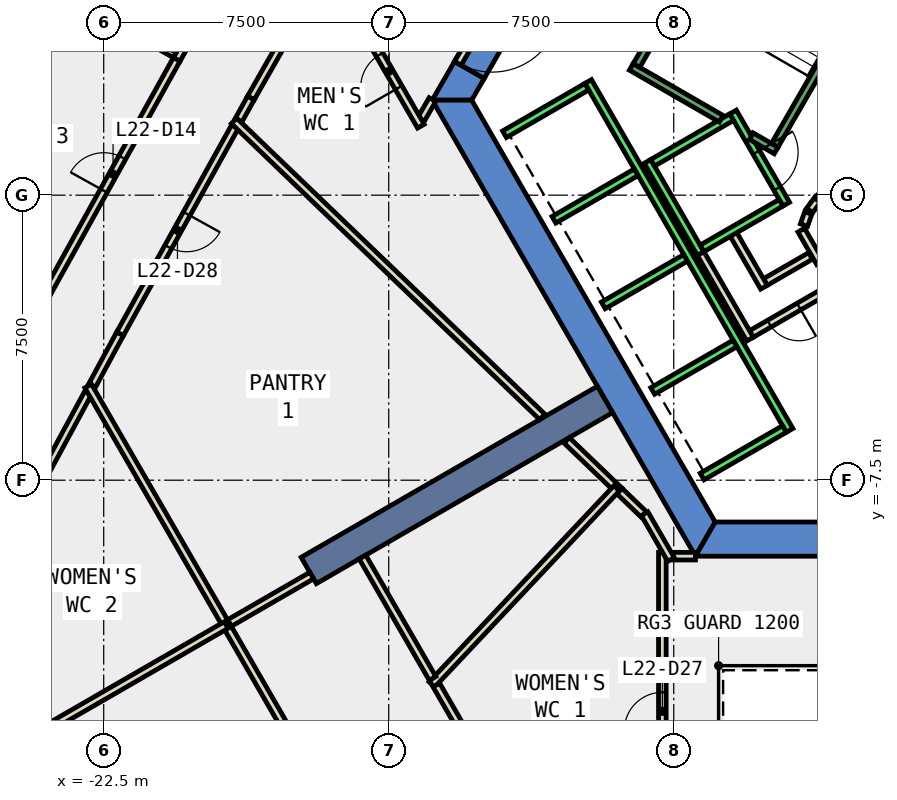
"""IFC4 building model, lengths in metres.
Left out: names, types, materials, properties, quantities, classifications, styles, units other than length and angle.
Written with IfcOpenShell. Run it as: python <this file> out.ifc"""

import sys

from ifc_helpers import new_model, si_unit, direction, frame, frame_2d, origin, place, context, subcontext, project, spatial, polyline, rectangle, outline, extrude, element, fill, save


model = new_model("IFC4")
c1 = context("Model", 3, precision=1e-05, world=origin(), true_north=direction((0.0, 1.0)))
c2 = subcontext(c1, "Body", "Model", "MODEL_VIEW")
j1 = project(units=[si_unit("LENGTHUNIT", "METRE"), si_unit("PLANEANGLEUNIT", "RADIAN")], contexts=[c1])
p1 = place(None, origin())
s1 = spatial("IfcSite", under=j1, at=p1, CompositionType="ELEMENT")
p2 = place(p1, origin())
s2 = spatial("IfcBuilding", under=s1, at=p2, CompositionType="ELEMENT")
p3 = place(p2, frame((0.0, 0.0, 103.4)))
s3 = spatial("IfcBuildingStorey", under=s2, at=p3, CompositionType="ELEMENT", Elevation=103.4)
p4 = place(p3, frame((0.0, 0.0, -0.4)))
e1 = element("IfcWall", 1, at=p4, inside=s3, PredefinedType="SHEAR", context=c2, shape_type="SweptSolid", body=[
    extrude(outline(polyline([(-12.488, 3.07), (-13.267, 3.52), (-13.856, 2.5), (-12.817, 2.5), (-12.488, 3.07)])), origin(), (0.0, 0.0, 1.0), 4.2),
])
p5 = place(p3, frame((0.0, 0.0, 3.6)))
e2 = element("IfcWall", 2, at=p5, inside=s3, PredefinedType="SHEAR", context=c2, shape_type="SweptSolid", body=[
    extrude(outline(polyline([(-13.267, 3.52), (-12.488, 3.07), (-11.488, 4.802), (-12.267, 5.252), (-13.267, 3.52)])), origin(), (0.0, 0.0, 1.0), 0.2),
])
p6 = place(p3, frame((0.0, 0.0, -0.4)))
e3 = element("IfcWall", 3, at=p6, inside=s3, PredefinedType="SHEAR", context=c2, shape_type="SweptSolid", body=[
    extrude(outline(polyline([(-13.856, 2.5), (-6.928, -9.5), (-6.409, -8.6), (-12.817, 2.5), (-13.856, 2.5)])), origin(), (0.0, 0.0, 1.0), 4.2),
])
p7 = place(p3, frame((0.0, 0.0, -0.4)))
e4 = element("IfcWall", 4, at=p7, inside=s3, PredefinedType="SHEAR", context=c2, shape_type="SweptSolid", body=[
    extrude(outline(polyline([(3.75, -9.5), (3.75, -8.6), (-6.409, -8.6), (-6.928, -9.5), (3.75, -9.5)])), origin(), (0.0, 0.0, 1.0), 4.2),
])
p8 = place(p3, frame((-9.31, -5.375, -0.4), z_axis=(0.0, 0.0, 1.0), x_axis=(-0.866017533419, -0.500013631625, 0.0)))
e5 = element("IfcWall", 5, at=p8, inside=s3, PredefinedType="SHEAR", context=c2, shape_type="SweptSolid", body=[
    extrude(rectangle(XDim=9.0, YDim=0.8, at=frame_2d((4.5, 0.0))), origin(), (0.0, 0.0, 1.0), 4.2),
])
p9 = place(p3, frame((-13.85, 2.514, 0.0), z_axis=(0.0, 0.0, 1.0), x_axis=(-0.500418219013, -0.865783810244, 0.0)))
e6 = element("IfcWall", 6, at=p9, inside=s3, PredefinedType="PARTITIONING", context=c2, shape_type="SweptSolid", body=[
    extrude(rectangle(XDim=0.607, YDim=0.2, at=frame_2d((0.304, 0.0))), origin(), (0.0, 0.0, 1.0), 3.8),
])
p10 = place(p3, frame((-14.154, 1.815, 0.0), z_axis=(0.0, 0.0, 1.0), x_axis=(-0.500038857296, 0.866002968352, 0.0)))
e7 = element("IfcWall", 7, at=p10, inside=s3, PredefinedType="PARTITIONING", context=c2, shape_type="SweptSolid", body=[
    extrude(rectangle(XDim=3.34, YDim=0.2, at=frame_2d((1.67, 0.0))), origin(), (0.0, 0.0, 1.0), 3.8),
])
p11 = place(p10, frame((1.17, 0.0, 0.0)))
e8 = element("IfcOpeningElement", 8, at=p11, cuts=e7, PredefinedType="OPENING", context=c2, shape_type="SweptSolid", body=[
    extrude(rectangle(XDim=1.0, YDim=2.1, at=frame_2d((0.5, 1.05))), frame((0.0, 0.11, 0.0), z_axis=(0.0, -1.0, 0.0), x_axis=(1.0, 0.0, 0.0)), (0.0, 0.0, 1.0), 0.22),
])
p12 = place(p3, frame((-16.986, 5.436, 0.0), z_axis=(0.0, 0.0, 1.0), x_axis=(-0.49514688151, -0.868809280412, 0.0)))
e9 = element("IfcWall", 9, at=p12, inside=s3, PredefinedType="PARTITIONING", context=c2, shape_type="SweptSolid", body=[
    extrude(rectangle(XDim=3.314, YDim=0.2, at=frame_2d((1.657, 0.0))), origin(), (0.0, 0.0, 1.0), 3.8),
])
p13 = place(p3, frame((-18.627, 2.557, 0.0), z_axis=(0.0, 0.0, 1.0), x_axis=(-0.484771582084, -0.874640790956, 0.0)))
e10 = element("IfcWall", 10, at=p13, inside=s3, PredefinedType="PARTITIONING", context=c2, shape_type="SweptSolid", body=[
    extrude(rectangle(XDim=0.666, YDim=0.2, at=frame_2d((0.333, 0.0))), origin(), (0.0, 0.0, 1.0), 3.8),
])
p14 = place(p3, frame((-19.047, 1.799, 0.0), z_axis=(0.0, 0.0, 1.0), x_axis=(-0.485240396382, -0.87438078531, 0.0)))
e11 = element("IfcWall", 11, at=p14, inside=s3, PredefinedType="PARTITIONING", context=c2, shape_type="SweptSolid", body=[
    extrude(rectangle(XDim=6.232, YDim=0.2, at=frame_2d((3.116, 0.0))), origin(), (0.0, 0.0, 1.0), 3.8),
])
p15 = place(p14, frame((2.616, 0.0, 0.0)))
e12 = element("IfcOpeningElement", 12, at=p15, cuts=e11, PredefinedType="OPENING", context=c2, shape_type="SweptSolid", body=[
    extrude(rectangle(XDim=1.0, YDim=2.1, at=frame_2d((0.5, 1.05))), frame((0.0, 0.11, 0.0), z_axis=(0.0, -1.0, 0.0), x_axis=(1.0, 0.0, 0.0)), (0.0, 0.0, 1.0), 0.22),
])
p16 = place(p3, frame((-22.071, -3.65, 0.0), z_axis=(0.0, 0.0, 1.0), x_axis=(-0.475212034938, -0.879871309823, 0.0)))
e13 = element("IfcWall", 13, at=p16, inside=s3, PredefinedType="PARTITIONING", context=c2, shape_type="SweptSolid", body=[
    extrude(rectangle(XDim=1.557, YDim=0.2, at=frame_2d((0.779, 0.0))), origin(), (0.0, 0.0, 1.0), 3.8),
])
p17 = place(p3, frame((-22.906, -5.196, 0.0), z_axis=(0.0, 0.0, 1.0), x_axis=(-0.475448213767, -0.879743710421, 0.0)))
e14 = element("IfcWall", 14, at=p17, inside=s3, PredefinedType="PARTITIONING", context=c2, shape_type="SweptSolid", body=[
    extrude(rectangle(XDim=5.343, YDim=0.2, at=frame_2d((2.671, 0.0))), origin(), (0.0, 0.0, 1.0), 3.8),
])
p18 = place(p3, frame((-20.581, 3.571, 0.0), z_axis=(0.0, 0.0, 1.0), x_axis=(0.495138372197, 0.868814129937, 0.0)))
e15 = element("IfcWall", 15, at=p18, inside=s3, PredefinedType="PARTITIONING", context=c2, shape_type="SweptSolid", body=[
    extrude(rectangle(XDim=7.124, YDim=0.2, at=frame_2d((3.562, 0.0))), origin(), (0.0, 0.0, 1.0), 3.8),
])
p19 = place(p18, frame((3.137, 0.0, 0.0)))
e16 = element("IfcOpeningElement", 16, at=p19, cuts=e15, PredefinedType="OPENING", context=c2, shape_type="SweptSolid", body=[
    extrude(rectangle(XDim=1.0, YDim=2.1, at=frame_2d((0.5, 1.05))), frame((0.0, 0.11, 0.0), z_axis=(0.0, -1.0, 0.0), x_axis=(1.0, 0.0, 0.0)), (0.0, 0.0, 1.0), 0.22),
])
p20 = place(p3, frame((-24.0, -2.593, 0.0), z_axis=(0.0, 0.0, 1.0), x_axis=(0.485148833338, 0.874431592242, 0.0)))
e17 = element("IfcWall", 17, at=p20, inside=s3, PredefinedType="PARTITIONING", context=c2, shape_type="SweptSolid", body=[
    extrude(rectangle(XDim=7.049, YDim=0.2, at=frame_2d((3.525, 0.0))), origin(), (0.0, 0.0, 1.0), 3.8),
])
p21 = place(p20, frame((3.099, 0.0, 0.0)))
e18 = element("IfcOpeningElement", 18, at=p21, cuts=e17, PredefinedType="OPENING", context=c2, shape_type="SweptSolid", body=[
    extrude(rectangle(XDim=1.0, YDim=2.1, at=frame_2d((0.5, 1.05))), frame((0.0, 0.11, 0.0), z_axis=(0.0, -1.0, 0.0), x_axis=(1.0, 0.0, 0.0)), (0.0, 0.0, 1.0), 0.22),
])
p22 = place(p3, frame((-3.9, -1.599, 0.0), z_axis=(0.0, 0.0, 1.0), x_axis=(-0.865969445389, -0.500096910261, 0.0)))
e19 = element("IfcWall", 19, at=p22, inside=s3, PredefinedType="PARTITIONING", context=c2, shape_type="SweptSolid", body=[
    extrude(rectangle(XDim=1.373, YDim=0.2, at=frame_2d((0.687, 0.0))), origin(), (0.0, 0.0, 1.0), 3.8),
])
p23 = place(p3, frame((-5.126, -2.422, 0.0), z_axis=(0.0, 0.0, 1.0), x_axis=(-0.500062241894, 0.865989465428, 0.0)))
e20 = element("IfcWall", 20, at=p23, inside=s3, PredefinedType="PARTITIONING", context=c2, shape_type="SweptSolid", body=[
    extrude(rectangle(XDim=1.7, YDim=0.2, at=frame_2d((0.85, 0.0))), origin(), (0.0, 0.0, 1.0), 3.8),
])
p24 = place(p3, frame((-3.65, -2.61, 0.0), z_axis=(0.0, 0.0, 1.0), x_axis=(-0.866072462134, -0.499918483688, 0.0)))
e21 = element("IfcWall", 21, at=p24, inside=s3, PredefinedType="PARTITIONING", context=c2, shape_type="SweptSolid", body=[
    extrude(rectangle(XDim=2.084, YDim=0.2, at=frame_2d((1.042, 0.0))), origin(), (0.0, 0.0, 1.0), 3.8),
])
p25 = place(p24, frame((0.642, 0.0, 0.0)))
e22 = element("IfcOpeningElement", 22, at=p25, cuts=e21, PredefinedType="OPENING", context=c2, shape_type="SweptSolid", body=[
    extrude(rectangle(XDim=0.9, YDim=2.1, at=frame_2d((0.45, 1.05))), frame((0.0, 0.11, 0.0), z_axis=(0.0, -1.0, 0.0), x_axis=(1.0, 0.0, 0.0)), (0.0, 0.0, 1.0), 0.22),
])
p26 = place(p3, frame((-5.492, -3.788, 0.0), z_axis=(0.0, 0.0, 1.0), x_axis=(-0.500008949224, 0.866020236886, 0.0)))
e23 = element("IfcWall", 23, at=p26, inside=s3, PredefinedType="PARTITIONING", context=c2, shape_type="SweptSolid", body=[
    extrude(rectangle(XDim=2.68, YDim=0.2, at=frame_2d((1.34, 0.0))), origin(), (0.0, 0.0, 1.0), 3.8),
])
p27 = place(p3, frame((-4.145, -0.92, 0.0), z_axis=(0.0, 0.0, 1.0), x_axis=(0.499743786207, -0.866173278362, 0.0)))
e24 = element("IfcWall", 24, at=p27, inside=s3, PredefinedType="PARTITIONING", context=c2, shape_type="SweptSolid", body=[
    extrude(rectangle(XDim=0.991, YDim=0.2, at=frame_2d((0.495, 0.0))), origin(), (0.0, 0.0, 1.0), 3.8),
])
p28 = place(p3, frame((-3.397, 0.124, 0.0), z_axis=(0.0, 0.0, 1.0), x_axis=(-0.804311165252, -0.594208338422, 0.0)))
e25 = element("IfcWall", 25, at=p28, inside=s3, PredefinedType="PARTITIONING", context=c2, shape_type="SweptSolid", body=[
    extrude(rectangle(XDim=0.338, YDim=0.2, at=frame_2d((0.169, 0.0))), origin(), (0.0, 0.0, 1.0), 3.8),
])
p29 = place(p3, frame((-3.723, -0.131, 0.0), z_axis=(0.0, 0.0, 1.0), x_axis=(-0.594675113454, -0.803966112121, 0.0)))
e26 = element("IfcWall", 26, at=p29, inside=s3, PredefinedType="PARTITIONING", context=c2, shape_type="SweptSolid", body=[
    extrude(rectangle(XDim=0.338, YDim=0.2, at=frame_2d((0.169, 0.0))), origin(), (0.0, 0.0, 1.0), 3.8),
])
p30 = place(p3, frame((-3.96, -0.47, 0.0), z_axis=(0.0, 0.0, 1.0), x_axis=(-0.334824194261, -0.942280615813, 0.0)))
e27 = element("IfcWall", 27, at=p30, inside=s3, PredefinedType="PARTITIONING", context=c2, shape_type="SweptSolid", body=[
    extrude(rectangle(XDim=0.338, YDim=0.2, at=frame_2d((0.169, 0.0))), origin(), (0.0, 0.0, 1.0), 3.8),
])
p31 = place(p3, frame((-7.522, -9.499, 0.0), z_axis=(0.0, 0.0, 1.0), x_axis=(1.0, 0.0, 0.0)))
e28 = element("IfcWall", 28, at=p31, inside=s3, PredefinedType="PARTITIONING", context=c2, shape_type="SweptSolid", body=[
    extrude(rectangle(XDim=0.593, YDim=0.2, at=frame_2d((0.296, 0.0))), origin(), (0.0, 0.0, 1.0), 3.8),
])
p32 = place(p3, frame((-7.8, -17.765, 0.0), z_axis=(0.0, 0.0, 1.0), x_axis=(0.0, 1.0, 0.0)))
e29 = element("IfcWall", 29, at=p32, inside=s3, PredefinedType="PARTITIONING", context=c2, shape_type="SweptSolid", body=[
    extrude(rectangle(XDim=8.366, YDim=0.2, at=frame_2d((4.183, 0.0))), origin(), (0.0, 0.0, 1.0), 3.8),
])
p33 = place(p32, frame((3.683, 0.0, 0.0)))
e30 = element("IfcOpeningElement", 30, at=p33, cuts=e29, PredefinedType="OPENING", context=c2, shape_type="SweptSolid", body=[
    extrude(rectangle(XDim=1.0, YDim=2.1, at=frame_2d((0.5, 1.05))), frame((0.0, 0.11, 0.0), z_axis=(0.0, -1.0, 0.0), x_axis=(1.0, 0.0, 0.0)), (0.0, 0.0, 1.0), 0.22),
])
p34 = place(p3, frame((-8.93, -7.783, 0.0), z_axis=(0.0, 0.0, 1.0), x_axis=(0.720954255291, -0.692982656189, 0.0)))
e31 = element("IfcWall", 31, at=p34, inside=s3, PredefinedType="PARTITIONING", context=c2, shape_type="SweptSolid", body=[
    extrude(rectangle(XDim=0.89, YDim=0.2, at=frame_2d((0.445, 0.0))), origin(), (0.0, 0.0, 1.0), 3.8),
])
p35 = place(p3, frame((-7.572, -9.586, 0.0), z_axis=(0.0, 0.0, 1.0), x_axis=(-0.499484152563, 0.866323023669, 0.0)))
e32 = element("IfcWall", 32, at=p35, inside=s3, PredefinedType="PARTITIONING", context=c2, shape_type="SweptSolid", body=[
    extrude(rectangle(XDim=1.39, YDim=0.2, at=frame_2d((0.695, 0.0))), origin(), (0.0, 0.0, 1.0), 3.8),
])
p36 = place(p3, frame((-8.93, -7.783, 0.0), z_axis=(0.0, 0.0, 1.0), x_axis=(-0.72124523191, 0.692679807305, 0.0)))
e33 = element("IfcWall", 33, at=p36, inside=s3, PredefinedType="PARTITIONING", context=c2, shape_type="SweptSolid", body=[
    extrude(rectangle(XDim=1.923, YDim=0.2, at=frame_2d((0.961, 0.0))), origin(), (0.0, 0.0, 1.0), 3.8),
])
p37 = place(p3, frame((-13.865, -12.876, 0.0), z_axis=(0.0, 0.0, 1.0), x_axis=(0.685651384846, 0.727930064263, 0.0)))
e34 = element("IfcWall", 34, at=p37, inside=s3, PredefinedType="PARTITIONING", context=c2, shape_type="SweptSolid", body=[
    extrude(rectangle(XDim=7.091, YDim=0.2, at=frame_2d((3.545, 0.0))), origin(), (0.0, 0.0, 1.0), 3.8),
])
p38 = place(p3, frame((-10.973, -17.695, 0.0), z_axis=(0.0, 0.0, 1.0), x_axis=(-0.499986535608, 0.866033177315, 0.0)))
e35 = element("IfcWall", 35, at=p38, inside=s3, PredefinedType="PARTITIONING", context=c2, shape_type="SweptSolid", body=[
    extrude(rectangle(XDim=5.549, YDim=0.2, at=frame_2d((2.774, 0.0))), origin(), (0.0, 0.0, 1.0), 3.8),
])
p39 = place(p3, frame((-13.847, -12.716, 0.0), z_axis=(0.0, 0.0, 1.0), x_axis=(-0.499861859587, 0.866105144501, 0.0)))
e36 = element("IfcWall", 36, at=p39, inside=s3, PredefinedType="PARTITIONING", context=c2, shape_type="SweptSolid", body=[
    extrude(rectangle(XDim=3.689, YDim=0.2, at=frame_2d((1.844, 0.0))), origin(), (0.0, 0.0, 1.0), 3.8),
])
p40 = place(p3, frame((-17.027, -10.009, 0.0), z_axis=(0.0, 0.0, 1.0), x_axis=(-0.865950948929, -0.500128937424, 0.0)))
e37 = element("IfcWall", 37, at=p40, inside=s3, PredefinedType="PARTITIONING", context=c2, shape_type="SweptSolid", body=[
    extrude(rectangle(XDim=2.599, YDim=0.2, at=frame_2d((1.3, 0.0))), origin(), (0.0, 0.0, 1.0), 3.8),
])
p41 = place(p3, frame((-19.278, -11.309, 0.0), z_axis=(0.0, 0.0, 1.0), x_axis=(-0.500044545065, 0.865999684151, 0.0)))
e38 = element("IfcWall", 38, at=p41, inside=s3, PredefinedType="PARTITIONING", context=c2, shape_type="SweptSolid", body=[
    extrude(rectangle(XDim=7.261, YDim=0.2, at=frame_2d((3.63, 0.0))), origin(), (0.0, 0.0, 1.0), 3.8),
])
p42 = place(p3, frame((-15.646, -17.6, 0.0), z_axis=(0.0, 0.0, 1.0), x_axis=(-0.499953299825, 0.866052364464, 0.0)))
e39 = element("IfcWall", 39, at=p42, inside=s3, PredefinedType="PARTITIONING", context=c2, shape_type="SweptSolid", body=[
    extrude(rectangle(XDim=7.263, YDim=0.2, at=frame_2d((3.631, 0.0))), origin(), (0.0, 0.0, 1.0), 3.8),
])
p43 = place(p3, frame((-19.277, -11.311, 0.0), z_axis=(0.0, 0.0, 1.0), x_axis=(-0.866078939042, -0.499907262747, 0.0)))
e40 = element("IfcWall", 40, at=p43, inside=s3, PredefinedType="PARTITIONING", context=c2, shape_type="SweptSolid", body=[
    extrude(rectangle(XDim=10.864, YDim=0.2, at=frame_2d((5.432, 0.0))), origin(), (0.0, 0.0, 1.0), 3.8),
])
p44 = place(p3, frame((-20.631, 3.685, 0.0), z_axis=(0.0, 0.0, 1.0), x_axis=(-0.871680720442, 0.490074200106, 0.0)))
e41 = element("IfcWall", 41, at=p44, inside=s3, PredefinedType="PARTITIONING", context=c2, shape_type="SweptSolid", body=[
    extrude(rectangle(XDim=5.33, YDim=0.15, at=frame_2d((2.665, 0.0))), origin(), (0.0, 0.0, 1.0), 3.8),
])
p45 = place(p3, frame((-12.18, 5.202, 0.0), z_axis=(0.0, 0.0, 1.0), x_axis=(-0.50002537861, -0.866010750942, 0.0)))
e42 = element("IfcWall", 42, at=p45, inside=s3, PredefinedType="PARTITIONING", context=c2, shape_type="SweptSolid", body=[
    extrude(rectangle(XDim=2.0, YDim=0.2, at=frame_2d((1.0, 0.0))), origin(), (0.0, 0.0, 1.0), 2.4),
])
p46 = place(p45, frame((0.19, 0.0, 0.0)))
e43 = element("IfcOpeningElement", 43, at=p46, cuts=e42, PredefinedType="OPENING", context=c2, shape_type="SweptSolid", body=[
    extrude(rectangle(XDim=1.8, YDim=2.1, at=frame_2d((0.9, 1.05))), frame((0.0, 0.11, 0.0), z_axis=(0.0, -1.0, 0.0), x_axis=(1.0, 0.0, 0.0)), (0.0, 0.0, 1.0), 0.22),
])
p47 = place(p3, frame((-10.96, -5.834, 0.0), z_axis=(0.0, 0.0, 1.0), x_axis=(-0.721236335428, 0.692689070549, 0.0)))
e44 = element("IfcWall", 44, at=p47, inside=s3, PredefinedType="PARTITIONING", context=c2, shape_type="SweptSolid", body=[
    extrude(rectangle(XDim=11.246, YDim=0.2, at=frame_2d((5.623, 0.0))), origin(), (0.0, 0.0, 1.0), 3.8),
])
p48 = place(p3, frame((-5.94, 2.188, 0.0), z_axis=(0.0, 0.0, 1.0), x_axis=(0.49994636267, -0.866056369097, 0.0)))
e45 = element("IfcWall", 45, at=p48, inside=s3, PredefinedType="STANDARD", context=c2, shape_type="SweptSolid", body=[
    extrude(rectangle(XDim=2.8, YDim=0.2, at=frame_2d((1.4, 0.0))), origin(), (0.0, 0.0, 1.0), 3.8),
])
p49 = place(p48, frame((1.225, 0.0, 0.0)))
e46 = element("IfcOpeningElement", 46, at=p49, cuts=e45, PredefinedType="OPENING", context=c2, shape_type="SweptSolid", body=[
    extrude(rectangle(XDim=1.1, YDim=2.1, at=frame_2d((0.55, 1.05))), frame((0.0, 0.11, 0.0), z_axis=(0.0, -1.0, 0.0), x_axis=(1.0, 0.0, 0.0)), (0.0, 0.0, 1.0), 0.22),
])
p50 = place(p3, frame((-8.192, 0.888, 0.0), z_axis=(0.0, 0.0, 1.0), x_axis=(0.49994636267, -0.866056369097, 0.0)))
e47 = element("IfcWall", 47, at=p50, inside=s3, PredefinedType="STANDARD", context=c2, shape_type="SweptSolid", body=[
    extrude(rectangle(XDim=2.8, YDim=0.2, at=frame_2d((1.4, 0.0))), origin(), (0.0, 0.0, 1.0), 3.8),
])
for number, where, z_axis, x_axis in (
    (48, (-5.977, 2.052, 0.0), (0.0, 0.0, 1.0), (-0.866, -0.5, 0.0)),
    (49, (-4.677, -0.2, 0.0), (0.0, 0.0, 1.0), (-0.866, -0.5, 0.0)),
):
    element("IfcWall", number, at=place(p3, frame(where, z_axis=z_axis, x_axis=x_axis)), inside=s3, PredefinedType="STANDARD", context=c2, shape_type="SweptSolid", body=[
        extrude(rectangle(XDim=2.399, YDim=0.2, at=frame_2d((1.2, 0.0))), origin(), (0.0, 0.0, 1.0), 3.8),
    ])
p51 = place(p3, frame((-9.751, 2.99, 0.0), z_axis=(0.0, 0.0, 1.0), x_axis=(0.50000090737, -0.866024879913, 0.0)))
e50 = element("IfcWall", 50, at=p51, inside=s3, PredefinedType="STANDARD", context=c2, shape_type="SweptSolid", body=[
    extrude(rectangle(XDim=10.6, YDim=0.2, at=frame_2d((5.3, 0.0))), origin(), (0.0, 0.0, 1.0), 3.8),
])
p52 = place(p3, frame((-9.788, 2.853, 0.0), z_axis=(0.0, 0.0, 1.0), x_axis=(-0.865998541277, -0.500046524342, 0.0)))
e51 = element("IfcWall", 51, at=p52, inside=s3, PredefinedType="STANDARD", context=c2, shape_type="SweptSolid", body=[
    extrude(rectangle(XDim=2.5, YDim=0.2, at=frame_2d((1.25, 0.0))), origin(), (0.0, 0.0, 1.0), 3.8),
])
for number, where, z_axis, x_axis in (
    (52, (-8.488, 0.602, 0.0), (0.0, 0.0, 1.0), (-0.866, -0.5, 0.0)),
    (53, (-7.188, -1.65, 0.0), (0.0, 0.0, 1.0), (-0.866, -0.5, 0.0)),
    (54, (-5.888, -3.902, 0.0), (0.0, 0.0, 1.0), (-0.866, -0.5, 0.0)),
    (55, (-4.588, -6.153, 0.0), (0.0, 0.0, 1.0), (-0.866, -0.5, 0.0)),
):
    element("IfcWall", number, at=place(p3, frame(where, z_axis=z_axis, x_axis=x_axis)), inside=s3, PredefinedType="STANDARD", context=c2, shape_type="SweptSolid", body=[
        extrude(rectangle(XDim=2.5, YDim=0.2, at=frame_2d((1.25, 0.0))), origin(), (0.0, 0.0, 1.0), 3.8),
    ])
p53 = place(p3, frame((-6.25, 2.01, 0.0), z_axis=(0.0, 0.0, 1.0), x_axis=(-0.86611865017, 0.499838457731, 0.0)))
e56 = element("IfcWall", 56, at=p53, inside=s3, PredefinedType="STANDARD", context=c2, shape_type="SweptSolid", body=[
    extrude(rectangle(XDim=2.733, YDim=0.2, at=frame_2d((1.366, 0.0))), origin(), (0.0, 0.0, 1.0), 3.8),
])
p54 = place(p3, frame((-4.806, 1.176, 0.0), z_axis=(0.0, 0.0, 1.0), x_axis=(-0.866558586415, 0.499075361355, 0.0)))
e57 = element("IfcWall", 57, at=p54, inside=s3, PredefinedType="STANDARD", context=c2, shape_type="SweptSolid", body=[
    extrude(rectangle(XDim=0.751, YDim=0.2, at=frame_2d((0.376, 0.0))), origin(), (0.0, 0.0, 1.0), 3.8),
])
p55 = place(p3, frame((-1.393, 7.288, 0.0), z_axis=(0.0, 0.0, 1.0), x_axis=(-0.499963383562, -0.866046543262, 0.0)))
e58 = element("IfcWall", 58, at=p55, inside=s3, PredefinedType="STANDARD", context=c2, shape_type="SweptSolid", body=[
    extrude(rectangle(XDim=6.9, YDim=0.2, at=frame_2d((3.45, 0.0))), origin(), (0.0, 0.0, 1.0), 3.8),
])
p56 = place(p55, frame((0.45, 0.0, 0.0)))
e59 = element("IfcOpeningElement", 59, at=p56, cuts=e58, PredefinedType="OPENING", context=c2, shape_type="SweptSolid", body=[
    extrude(rectangle(XDim=1.1, YDim=2.2, at=frame_2d((0.55, 1.1))), frame((0.0, 0.11, 0.0), z_axis=(0.0, -1.0, 0.0), x_axis=(1.0, 0.0, 0.0)), (0.0, 0.0, 1.0), 0.22),
])
p57 = place(p3, frame((-5.03, 9.388, 0.0), z_axis=(0.0, 0.0, 1.0), x_axis=(-0.499978703459, -0.866037698999, 0.0)))
e60 = element("IfcWall", 60, at=p57, inside=s3, PredefinedType="STANDARD", context=c2, shape_type="SweptSolid", body=[
    extrude(rectangle(XDim=6.9, YDim=0.2, at=frame_2d((3.45, 0.0))), origin(), (0.0, 0.0, 1.0), 3.8),
])
p58 = place(p21, origin())
e61 = element("IfcDoor", 61, at=p58, inside=s3, OperationType="SINGLE_SWING_LEFT", PredefinedType="DOOR", context=c2, shape_type="SweptSolid", body=[
    extrude(rectangle(XDim=1.0, YDim=2.1, at=frame_2d((0.5, 1.05))), frame((0.0, 0.025, 0.0), z_axis=(0.0, -1.0, 0.0), x_axis=(1.0, 0.0, 0.0)), (0.0, 0.0, 1.0), 0.05),
])
fill(e18, e61)
p59 = place(p11, origin())
e62 = element("IfcDoor", 62, at=p59, inside=s3, OperationType="SINGLE_SWING_LEFT", PredefinedType="DOOR", context=c2, shape_type="SweptSolid", body=[
    extrude(rectangle(XDim=1.0, YDim=2.1, at=frame_2d((0.5, 1.05))), frame((0.0, 0.025, 0.0), z_axis=(0.0, -1.0, 0.0), x_axis=(1.0, 0.0, 0.0)), (0.0, 0.0, 1.0), 0.05),
])
fill(e8, e62)
p60 = place(p33, origin())
e63 = element("IfcDoor", 63, at=p60, inside=s3, OperationType="SINGLE_SWING_RIGHT", PredefinedType="DOOR", context=c2, shape_type="SweptSolid", body=[
    extrude(rectangle(XDim=1.0, YDim=2.1, at=frame_2d((0.5, 1.05))), frame((0.0, 0.025, 0.0), z_axis=(0.0, -1.0, 0.0), x_axis=(1.0, 0.0, 0.0)), (0.0, 0.0, 1.0), 0.05),
])
fill(e30, e63)
p61 = place(p15, origin())
e64 = element("IfcDoor", 64, at=p61, inside=s3, OperationType="SINGLE_SWING_LEFT", PredefinedType="DOOR", context=c2, shape_type="SweptSolid", body=[
    extrude(rectangle(XDim=1.0, YDim=2.1, at=frame_2d((0.5, 1.05))), frame((0.0, 0.025, 0.0), z_axis=(0.0, -1.0, 0.0), x_axis=(1.0, 0.0, 0.0)), (0.0, 0.0, 1.0), 0.05),
])
fill(e12, e64)
p62 = place(p25, origin())
e65 = element("IfcDoor", 65, at=p62, inside=s3, OperationType="SINGLE_SWING_LEFT", PredefinedType="DOOR", context=c2, shape_type="SweptSolid", body=[
    extrude(rectangle(XDim=0.9, YDim=2.1, at=frame_2d((0.45, 1.05))), frame((0.0, 0.025, 0.0), z_axis=(0.0, -1.0, 0.0), x_axis=(1.0, 0.0, 0.0)), (0.0, 0.0, 1.0), 0.05),
])
fill(e22, e65)
p63 = place(p46, origin())
e66 = element("IfcDoor", 66, at=p63, inside=s3, OperationType="DOUBLE_DOOR_SINGLE_SWING", PredefinedType="DOOR", context=c2, shape_type="SweptSolid", body=[
    extrude(rectangle(XDim=1.8, YDim=2.1, at=frame_2d((0.9, 1.05))), frame((0.0, 0.025, 0.0), z_axis=(0.0, -1.0, 0.0), x_axis=(1.0, 0.0, 0.0)), (0.0, 0.0, 1.0), 0.05),
])
fill(e43, e66)
p64 = place(p49, origin())
e67 = element("IfcDoor", 67, at=p64, inside=s3, OperationType="SLIDING_TO_LEFT", PredefinedType="DOOR", context=c2, shape_type="SweptSolid", body=[
    extrude(rectangle(XDim=1.1, YDim=2.1, at=frame_2d((0.55, 1.05))), frame((0.0, 0.025, 0.0), z_axis=(0.0, -1.0, 0.0), x_axis=(1.0, 0.0, 0.0)), (0.0, 0.0, 1.0), 0.05),
])
fill(e46, e67)
save(model, sys.argv[1])
